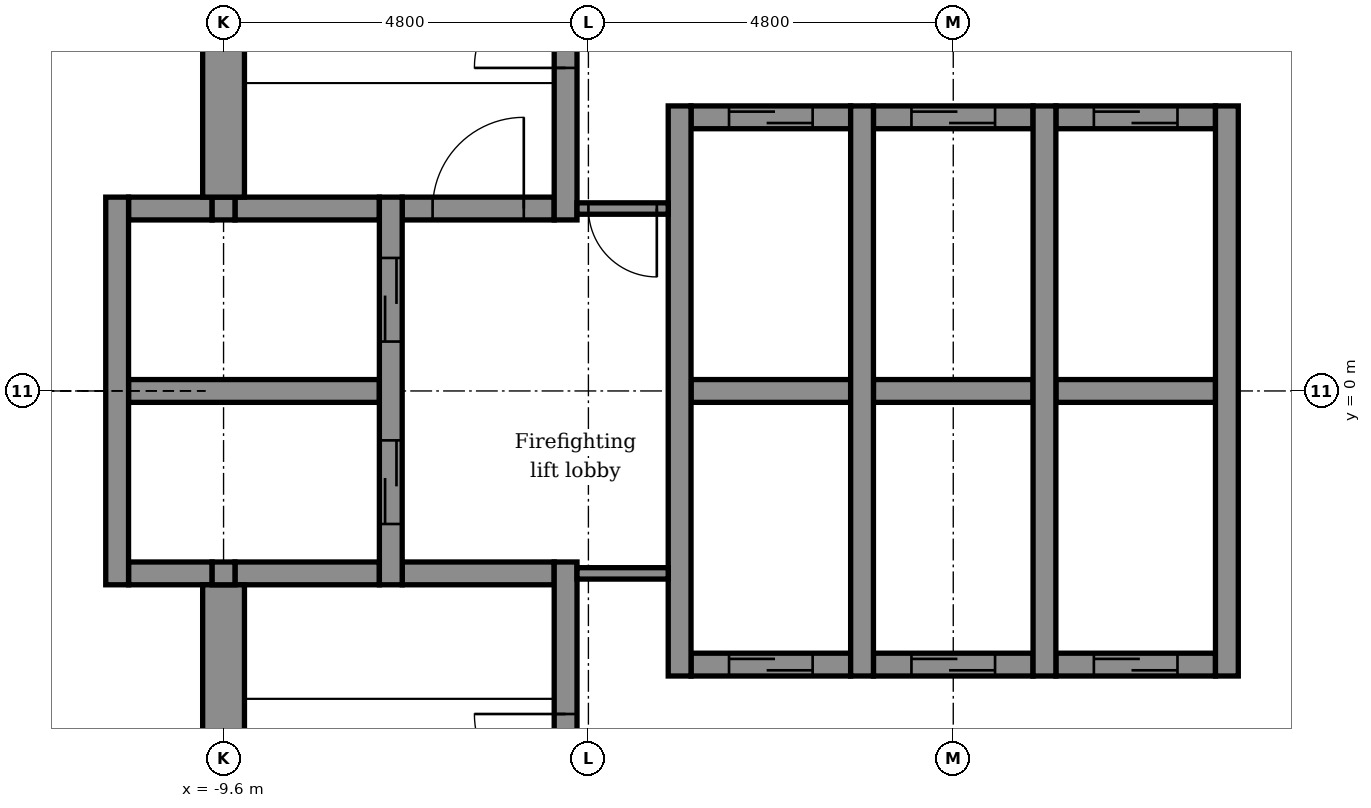
"""IFC4 building model, lengths in metres.
Left out: names, types, materials, properties, quantities, classifications, styles, units other than length and angle.
Written with IfcOpenShell. Run it as: python <this file> out.ifc"""

import sys

from ifc_helpers import new_model, si_unit, direction, frame, frame_2d, origin, place, context, subcontext, project, spatial, rectangle, extrude, element, fill, save


model = new_model("IFC4")
c1 = context("Model", 3, precision=1e-05, world=origin(), true_north=direction((0.0, 1.0)))
c2 = subcontext(c1, "Body", "Model", "MODEL_VIEW")
j1 = project(units=[si_unit("LENGTHUNIT", "METRE"), si_unit("PLANEANGLEUNIT", "RADIAN")], contexts=[c1])
p1 = place(None, origin())
s1 = spatial("IfcSite", under=j1, at=p1, CompositionType="ELEMENT")
p2 = place(p1, origin())
s2 = spatial("IfcBuilding", under=s1, at=p2, CompositionType="ELEMENT")
p3 = place(p2, frame((0.0, 0.0, 238.4)))
s3 = spatial("IfcBuildingStorey", under=s2, at=p3, CompositionType="ELEMENT", Elevation=238.4)
p4 = place(p3, frame((-3.45, -3.6, -0.15), z_axis=(0.0, 0.0, 1.0), x_axis=(1.0, 0.0, 0.0)))
e1 = element("IfcWall", 1, at=p4, inside=s3, PredefinedType="STANDARD", context=c2, shape_type="SweptSolid", body=[
    extrude(rectangle(XDim=2.1, YDim=0.3, at=frame_2d((1.05, 0.0))), origin(), (0.0, 0.0, 1.0), 3.9),
])
p5 = place(p4, frame((0.5, 0.0, 0.15)))
e2 = element("IfcOpeningElement", 2, at=p5, cuts=e1, PredefinedType="OPENING", context=c2, shape_type="SweptSolid", body=[
    extrude(rectangle(XDim=1.1, YDim=2.1, at=frame_2d((0.55, 1.05))), frame((0.0, 0.16, 0.0), z_axis=(0.0, -1.0, 0.0), x_axis=(1.0, 0.0, 0.0)), (0.0, 0.0, 1.0), 0.32),
])
p6 = place(p3, frame((-1.05, -3.6, -0.15), z_axis=(0.0, 0.0, 1.0), x_axis=(1.0, 0.0, 0.0)))
e3 = element("IfcWall", 3, at=p6, inside=s3, PredefinedType="STANDARD", context=c2, shape_type="SweptSolid", body=[
    extrude(rectangle(XDim=2.1, YDim=0.3, at=frame_2d((1.05, 0.0))), origin(), (0.0, 0.0, 1.0), 3.9),
])
p7 = place(p6, frame((0.5, 0.0, 0.15)))
e4 = element("IfcOpeningElement", 4, at=p7, cuts=e3, PredefinedType="OPENING", context=c2, shape_type="SweptSolid", body=[
    extrude(rectangle(XDim=1.1, YDim=2.1, at=frame_2d((0.55, 1.05))), frame((0.0, 0.16, 0.0), z_axis=(0.0, -1.0, 0.0), x_axis=(1.0, 0.0, 0.0)), (0.0, 0.0, 1.0), 0.32),
])
p8 = place(p3, frame((1.35, -3.6, -0.15), z_axis=(0.0, 0.0, 1.0), x_axis=(1.0, 0.0, 0.0)))
e5 = element("IfcWall", 5, at=p8, inside=s3, PredefinedType="STANDARD", context=c2, shape_type="SweptSolid", body=[
    extrude(rectangle(XDim=2.1, YDim=0.3, at=frame_2d((1.05, 0.0))), origin(), (0.0, 0.0, 1.0), 3.9),
])
p9 = place(p8, frame((0.5, 0.0, 0.15)))
e6 = element("IfcOpeningElement", 6, at=p9, cuts=e5, PredefinedType="OPENING", context=c2, shape_type="SweptSolid", body=[
    extrude(rectangle(XDim=1.1, YDim=2.1, at=frame_2d((0.55, 1.05))), frame((0.0, 0.16, 0.0), z_axis=(0.0, -1.0, 0.0), x_axis=(1.0, 0.0, 0.0)), (0.0, 0.0, 1.0), 0.32),
])
p10 = place(p3, frame((-10.85, -2.4, -0.15), z_axis=(0.0, 0.0, 1.0), x_axis=(1.0, 0.0, 0.0)))
e7 = element("IfcWall", 7, at=p10, inside=s3, PredefinedType="STANDARD", context=c2, shape_type="SweptSolid", body=[
    extrude(rectangle(XDim=1.1, YDim=0.3, at=frame_2d((0.55, 0.0))), origin(), (0.0, 0.0, 1.0), 3.9),
])
p11 = place(p3, frame((-9.45, -2.4, -0.15), z_axis=(0.0, 0.0, 1.0), x_axis=(1.0, 0.0, 0.0)))
e8 = element("IfcWall", 8, at=p11, inside=s3, PredefinedType="STANDARD", context=c2, shape_type="SweptSolid", body=[
    extrude(rectangle(XDim=1.9, YDim=0.3, at=frame_2d((0.95, 0.0))), origin(), (0.0, 0.0, 1.0), 3.9),
])
p12 = place(p3, frame((-7.25, -2.4, -0.15), z_axis=(0.0, 0.0, 1.0), x_axis=(1.0, 0.0, 0.0)))
e9 = element("IfcWall", 9, at=p12, inside=s3, PredefinedType="STANDARD", context=c2, shape_type="SweptSolid", body=[
    extrude(rectangle(XDim=2.0, YDim=0.3, at=frame_2d((1.0, 0.0))), origin(), (0.0, 0.0, 1.0), 3.9),
])
p13 = place(p3, frame((-10.85, 0.0, -0.15), z_axis=(0.0, 0.0, 1.0), x_axis=(1.0, 0.0, 0.0)))
e10 = element("IfcWall", 10, at=p13, inside=s3, PredefinedType="STANDARD", context=c2, shape_type="SweptSolid", body=[
    extrude(rectangle(XDim=3.3, YDim=0.3, at=frame_2d((1.65, 0.0))), origin(), (0.0, 0.0, 1.0), 3.9),
])
p14 = place(p3, frame((-3.45, 0.0, -0.15), z_axis=(0.0, 0.0, 1.0), x_axis=(1.0, 0.0, 0.0)))
e11 = element("IfcWall", 11, at=p14, inside=s3, PredefinedType="STANDARD", context=c2, shape_type="SweptSolid", body=[
    extrude(rectangle(XDim=2.1, YDim=0.3, at=frame_2d((1.05, 0.0))), origin(), (0.0, 0.0, 1.0), 3.9),
])
p15 = place(p3, frame((-1.05, 0.0, -0.15), z_axis=(0.0, 0.0, 1.0), x_axis=(1.0, 0.0, 0.0)))
e12 = element("IfcWall", 12, at=p15, inside=s3, PredefinedType="STANDARD", context=c2, shape_type="SweptSolid", body=[
    extrude(rectangle(XDim=2.1, YDim=0.3, at=frame_2d((1.05, 0.0))), origin(), (0.0, 0.0, 1.0), 3.9),
])
p16 = place(p3, frame((1.35, 0.0, -0.15), z_axis=(0.0, 0.0, 1.0), x_axis=(1.0, 0.0, 0.0)))
e13 = element("IfcWall", 13, at=p16, inside=s3, PredefinedType="STANDARD", context=c2, shape_type="SweptSolid", body=[
    extrude(rectangle(XDim=2.1, YDim=0.3, at=frame_2d((1.05, 0.0))), origin(), (0.0, 0.0, 1.0), 3.9),
])
p17 = place(p3, frame((-10.85, 2.4, -0.15), z_axis=(0.0, 0.0, 1.0), x_axis=(1.0, 0.0, 0.0)))
e14 = element("IfcWall", 14, at=p17, inside=s3, PredefinedType="STANDARD", context=c2, shape_type="SweptSolid", body=[
    extrude(rectangle(XDim=1.1, YDim=0.3, at=frame_2d((0.55, 0.0))), origin(), (0.0, 0.0, 1.0), 3.9),
])
p18 = place(p3, frame((-9.45, 2.4, -0.15), z_axis=(0.0, 0.0, 1.0), x_axis=(1.0, 0.0, 0.0)))
e15 = element("IfcWall", 15, at=p18, inside=s3, PredefinedType="STANDARD", context=c2, shape_type="SweptSolid", body=[
    extrude(rectangle(XDim=1.9, YDim=0.3, at=frame_2d((0.95, 0.0))), origin(), (0.0, 0.0, 1.0), 3.9),
])
p19 = place(p3, frame((-7.25, 2.4, -0.15), z_axis=(0.0, 0.0, 1.0), x_axis=(1.0, 0.0, 0.0)))
e16 = element("IfcWall", 16, at=p19, inside=s3, PredefinedType="STANDARD", context=c2, shape_type="SweptSolid", body=[
    extrude(rectangle(XDim=2.0, YDim=0.3, at=frame_2d((1.0, 0.0))), origin(), (0.0, 0.0, 1.0), 3.9),
])
p20 = place(p19, frame((0.4, 0.0, 0.15)))
e17 = element("IfcOpeningElement", 17, at=p20, cuts=e16, PredefinedType="OPENING", context=c2, shape_type="SweptSolid", body=[
    extrude(rectangle(XDim=1.2, YDim=2.1, at=frame_2d((0.6, 1.05))), frame((0.0, 0.16, 0.0), z_axis=(0.0, -1.0, 0.0), x_axis=(1.0, 0.0, 0.0)), (0.0, 0.0, 1.0), 0.32),
])
p21 = place(p3, frame((-3.45, 3.6, -0.15), z_axis=(0.0, 0.0, 1.0), x_axis=(1.0, 0.0, 0.0)))
e18 = element("IfcWall", 18, at=p21, inside=s3, PredefinedType="STANDARD", context=c2, shape_type="SweptSolid", body=[
    extrude(rectangle(XDim=2.1, YDim=0.3, at=frame_2d((1.05, 0.0))), origin(), (0.0, 0.0, 1.0), 3.9),
])
p22 = place(p21, frame((0.5, 0.0, 0.15)))
e19 = element("IfcOpeningElement", 19, at=p22, cuts=e18, PredefinedType="OPENING", context=c2, shape_type="SweptSolid", body=[
    extrude(rectangle(XDim=1.1, YDim=2.1, at=frame_2d((0.55, 1.05))), frame((0.0, 0.16, 0.0), z_axis=(0.0, -1.0, 0.0), x_axis=(1.0, 0.0, 0.0)), (0.0, 0.0, 1.0), 0.32),
])
p23 = place(p3, frame((-1.05, 3.6, -0.15), z_axis=(0.0, 0.0, 1.0), x_axis=(1.0, 0.0, 0.0)))
e20 = element("IfcWall", 20, at=p23, inside=s3, PredefinedType="STANDARD", context=c2, shape_type="SweptSolid", body=[
    extrude(rectangle(XDim=2.1, YDim=0.3, at=frame_2d((1.05, 0.0))), origin(), (0.0, 0.0, 1.0), 3.9),
])
p24 = place(p23, frame((0.5, 0.0, 0.15)))
e21 = element("IfcOpeningElement", 21, at=p24, cuts=e20, PredefinedType="OPENING", context=c2, shape_type="SweptSolid", body=[
    extrude(rectangle(XDim=1.1, YDim=2.1, at=frame_2d((0.55, 1.05))), frame((0.0, 0.16, 0.0), z_axis=(0.0, -1.0, 0.0), x_axis=(1.0, 0.0, 0.0)), (0.0, 0.0, 1.0), 0.32),
])
p25 = place(p3, frame((1.35, 3.6, -0.15), z_axis=(0.0, 0.0, 1.0), x_axis=(1.0, 0.0, 0.0)))
e22 = element("IfcWall", 22, at=p25, inside=s3, PredefinedType="STANDARD", context=c2, shape_type="SweptSolid", body=[
    extrude(rectangle(XDim=2.1, YDim=0.3, at=frame_2d((1.05, 0.0))), origin(), (0.0, 0.0, 1.0), 3.9),
])
p26 = place(p25, frame((0.5, 0.0, 0.15)))
e23 = element("IfcOpeningElement", 23, at=p26, cuts=e22, PredefinedType="OPENING", context=c2, shape_type="SweptSolid", body=[
    extrude(rectangle(XDim=1.1, YDim=2.1, at=frame_2d((0.55, 1.05))), frame((0.0, 0.16, 0.0), z_axis=(0.0, -1.0, 0.0), x_axis=(1.0, 0.0, 0.0)), (0.0, 0.0, 1.0), 0.32),
])
p27 = place(p3, frame((-11.0, -2.55, -0.15), z_axis=(0.0, 0.0, 1.0), x_axis=(0.0, 1.0, 0.0)))
e24 = element("IfcWall", 24, at=p27, inside=s3, PredefinedType="STANDARD", context=c2, shape_type="SweptSolid", body=[
    extrude(rectangle(XDim=5.1, YDim=0.3, at=frame_2d((2.55, 0.0))), origin(), (0.0, 0.0, 1.0), 3.9),
])
p28 = place(p3, frame((-9.6, -10.15, -0.15), z_axis=(0.0, 0.0, 1.0), x_axis=(0.0, 1.0, 0.0)))
e25 = element("IfcWall", 25, at=p28, inside=s3, PredefinedType="SHEAR", context=c2, shape_type="SweptSolid", body=[
    extrude(rectangle(XDim=7.6, YDim=0.55, at=frame_2d((3.8, 0.0))), origin(), (0.0, 0.0, 1.0), 3.9),
])
for number, where, z_axis, x_axis in (
    (26, (-9.6, -2.55, -0.15), (0.0, 0.0, 1.0), (0.0, 1.0, 0.0)),
    (27, (-9.6, 2.25, -0.15), (0.0, 0.0, 1.0), (0.0, 1.0, 0.0)),
):
    element("IfcWall", number, at=place(p3, frame(where, z_axis=z_axis, x_axis=x_axis)), inside=s3, PredefinedType="STANDARD", context=c2, shape_type="SweptSolid", body=[
        extrude(rectangle(XDim=0.3, YDim=0.3, at=frame_2d((0.15, 0.0))), origin(), (0.0, 0.0, 1.0), 3.9),
    ])
p29 = place(p3, frame((-9.6, 2.55, -0.15), z_axis=(0.0, 0.0, 1.0), x_axis=(0.0, 1.0, 0.0)))
e28 = element("IfcWall", 28, at=p29, inside=s3, PredefinedType="SHEAR", context=c2, shape_type="SweptSolid", body=[
    extrude(rectangle(XDim=7.6, YDim=0.55, at=frame_2d((3.8, 0.0))), origin(), (0.0, 0.0, 1.0), 3.9),
])
p30 = place(p3, frame((-7.4, -2.55, -0.15), z_axis=(0.0, 0.0, 1.0), x_axis=(0.0, 1.0, 0.0)))
e29 = element("IfcWall", 29, at=p30, inside=s3, PredefinedType="STANDARD", context=c2, shape_type="SweptSolid", body=[
    extrude(rectangle(XDim=5.1, YDim=0.3, at=frame_2d((2.55, 0.0))), origin(), (0.0, 0.0, 1.0), 3.9),
])
p31 = place(p30, frame((0.8, 0.0, 0.15)))
e30 = element("IfcOpeningElement", 30, at=p31, cuts=e29, PredefinedType="OPENING", context=c2, shape_type="SweptSolid", body=[
    extrude(rectangle(XDim=1.1, YDim=2.1, at=frame_2d((0.55, 1.05))), frame((0.0, 0.16, 0.0), z_axis=(0.0, -1.0, 0.0), x_axis=(1.0, 0.0, 0.0)), (0.0, 0.0, 1.0), 0.32),
])
p32 = place(p30, frame((3.2, 0.0, 0.15)))
e31 = element("IfcOpeningElement", 31, at=p32, cuts=e29, PredefinedType="OPENING", context=c2, shape_type="SweptSolid", body=[
    extrude(rectangle(XDim=1.1, YDim=2.1, at=frame_2d((0.55, 1.05))), frame((0.0, 0.16, 0.0), z_axis=(0.0, -1.0, 0.0), x_axis=(1.0, 0.0, 0.0)), (0.0, 0.0, 1.0), 0.32),
])
p33 = place(p3, frame((-5.1, -9.325, -0.15), z_axis=(0.0, 0.0, 1.0), x_axis=(0.0, 1.0, 0.0)))
e32 = element("IfcWall", 32, at=p33, inside=s3, PredefinedType="STANDARD", context=c2, shape_type="SweptSolid", body=[
    extrude(rectangle(XDim=7.075, YDim=0.3, at=frame_2d((3.538, 0.0))), origin(), (0.0, 0.0, 1.0), 3.9),
])
p34 = place(p33, frame((3.875, 0.0, 0.15)))
e33 = element("IfcOpeningElement", 33, at=p34, cuts=e32, PredefinedType="OPENING", context=c2, shape_type="SweptSolid", body=[
    extrude(rectangle(XDim=1.2, YDim=2.1, at=frame_2d((0.6, 1.05))), frame((0.0, 0.16, 0.0), z_axis=(0.0, -1.0, 0.0), x_axis=(1.0, 0.0, 0.0)), (0.0, 0.0, 1.0), 0.32),
])
p35 = place(p3, frame((-5.1, 2.25, -0.15), z_axis=(0.0, 0.0, 1.0), x_axis=(0.0, 1.0, 0.0)))
e34 = element("IfcWall", 34, at=p35, inside=s3, PredefinedType="STANDARD", context=c2, shape_type="SweptSolid", body=[
    extrude(rectangle(XDim=7.075, YDim=0.3, at=frame_2d((3.538, 0.0))), origin(), (0.0, 0.0, 1.0), 3.9),
])
p36 = place(p35, frame((2.0, 0.0, 0.15)))
e35 = element("IfcOpeningElement", 35, at=p36, cuts=e34, PredefinedType="OPENING", context=c2, shape_type="SweptSolid", body=[
    extrude(rectangle(XDim=1.2, YDim=2.1, at=frame_2d((0.6, 1.05))), frame((0.0, 0.16, 0.0), z_axis=(0.0, -1.0, 0.0), x_axis=(1.0, 0.0, 0.0)), (0.0, 0.0, 1.0), 0.32),
])
for number, where, z_axis, x_axis in (
    (36, (-3.6, -3.75, -0.15), (0.0, 0.0, 1.0), (0.0, 1.0, 0.0)),
    (37, (-1.2, -3.75, -0.15), (0.0, 0.0, 1.0), (0.0, 1.0, 0.0)),
    (38, (1.2, -3.75, -0.15), (0.0, 0.0, 1.0), (0.0, 1.0, 0.0)),
    (39, (3.6, -3.75, -0.15), (0.0, 0.0, 1.0), (0.0, 1.0, 0.0)),
):
    element("IfcWall", number, at=place(p3, frame(where, z_axis=z_axis, x_axis=x_axis)), inside=s3, PredefinedType="STANDARD", context=c2, shape_type="SweptSolid", body=[
        extrude(rectangle(XDim=7.5, YDim=0.3, at=frame_2d((3.75, 0.0))), origin(), (0.0, 0.0, 1.0), 3.9),
    ])
p37 = place(p3, frame((-4.95, 2.4, 0.0), z_axis=(0.0, 0.0, 1.0), x_axis=(1.0, 0.0, 0.0)))
e40 = element("IfcWall", 40, at=p37, inside=s3, PredefinedType="PARTITIONING", context=c2, shape_type="SweptSolid", body=[
    extrude(rectangle(XDim=1.2, YDim=0.15, at=frame_2d((0.6, 0.0))), origin(), (0.0, 0.0, 1.0), 3.75),
])
p38 = place(p37, frame((0.15, 0.0, 0.0)))
e41 = element("IfcOpeningElement", 41, at=p38, cuts=e40, PredefinedType="OPENING", context=c2, shape_type="SweptSolid", body=[
    extrude(rectangle(XDim=0.9, YDim=2.1, at=frame_2d((0.45, 1.05))), frame((0.0, 0.085, 0.0), z_axis=(0.0, -1.0, 0.0), x_axis=(1.0, 0.0, 0.0)), (0.0, 0.0, 1.0), 0.17),
])
p39 = place(p3, frame((-4.95, -2.4, 0.0), z_axis=(0.0, 0.0, 1.0), x_axis=(1.0, 0.0, 0.0)))
e42 = element("IfcWall", 42, at=p39, inside=s3, PredefinedType="PARTITIONING", context=c2, shape_type="SweptSolid", body=[
    extrude(rectangle(XDim=1.2, YDim=0.15, at=frame_2d((0.6, 0.0))), origin(), (0.0, 0.0, 1.0), 3.75),
])
p40 = place(p31, origin())
e43 = element("IfcDoor", 43, at=p40, inside=s3, OperationType="DOUBLE_DOOR_SLIDING", PredefinedType="DOOR", context=c2, shape_type="SweptSolid", body=[
    extrude(rectangle(XDim=1.1, YDim=2.1, at=frame_2d((0.55, 1.05))), frame((0.0, 0.025, 0.0), z_axis=(0.0, -1.0, 0.0), x_axis=(1.0, 0.0, 0.0)), (0.0, 0.0, 1.0), 0.05),
])
fill(e30, e43)
p41 = place(p32, origin())
e44 = element("IfcDoor", 44, at=p41, inside=s3, OperationType="DOUBLE_DOOR_SLIDING", PredefinedType="DOOR", context=c2, shape_type="SweptSolid", body=[
    extrude(rectangle(XDim=1.1, YDim=2.1, at=frame_2d((0.55, 1.05))), frame((0.0, 0.025, 0.0), z_axis=(0.0, -1.0, 0.0), x_axis=(1.0, 0.0, 0.0)), (0.0, 0.0, 1.0), 0.05),
])
fill(e31, e44)
p42 = place(p22, origin())
e45 = element("IfcDoor", 45, at=p42, inside=s3, OperationType="DOUBLE_DOOR_SLIDING", PredefinedType="DOOR", context=c2, shape_type="SweptSolid", body=[
    extrude(rectangle(XDim=1.1, YDim=2.1, at=frame_2d((0.55, 1.05))), frame((0.0, 0.025, 0.0), z_axis=(0.0, -1.0, 0.0), x_axis=(1.0, 0.0, 0.0)), (0.0, 0.0, 1.0), 0.05),
])
fill(e19, e45)
p43 = place(p24, origin())
e46 = element("IfcDoor", 46, at=p43, inside=s3, OperationType="DOUBLE_DOOR_SLIDING", PredefinedType="DOOR", context=c2, shape_type="SweptSolid", body=[
    extrude(rectangle(XDim=1.1, YDim=2.1, at=frame_2d((0.55, 1.05))), frame((0.0, 0.025, 0.0), z_axis=(0.0, -1.0, 0.0), x_axis=(1.0, 0.0, 0.0)), (0.0, 0.0, 1.0), 0.05),
])
fill(e21, e46)
p44 = place(p26, origin())
e47 = element("IfcDoor", 47, at=p44, inside=s3, OperationType="DOUBLE_DOOR_SLIDING", PredefinedType="DOOR", context=c2, shape_type="SweptSolid", body=[
    extrude(rectangle(XDim=1.1, YDim=2.1, at=frame_2d((0.55, 1.05))), frame((0.0, 0.025, 0.0), z_axis=(0.0, -1.0, 0.0), x_axis=(1.0, 0.0, 0.0)), (0.0, 0.0, 1.0), 0.05),
])
fill(e23, e47)
p45 = place(p5, origin())
e48 = element("IfcDoor", 48, at=p45, inside=s3, OperationType="DOUBLE_DOOR_SLIDING", PredefinedType="DOOR", context=c2, shape_type="SweptSolid", body=[
    extrude(rectangle(XDim=1.1, YDim=2.1, at=frame_2d((0.55, 1.05))), frame((0.0, 0.025, 0.0), z_axis=(0.0, -1.0, 0.0), x_axis=(1.0, 0.0, 0.0)), (0.0, 0.0, 1.0), 0.05),
])
fill(e2, e48)
p46 = place(p7, origin())
e49 = element("IfcDoor", 49, at=p46, inside=s3, OperationType="DOUBLE_DOOR_SLIDING", PredefinedType="DOOR", context=c2, shape_type="SweptSolid", body=[
    extrude(rectangle(XDim=1.1, YDim=2.1, at=frame_2d((0.55, 1.05))), frame((0.0, 0.025, 0.0), z_axis=(0.0, -1.0, 0.0), x_axis=(1.0, 0.0, 0.0)), (0.0, 0.0, 1.0), 0.05),
])
fill(e4, e49)
p47 = place(p9, origin())
e50 = element("IfcDoor", 50, at=p47, inside=s3, OperationType="DOUBLE_DOOR_SLIDING", PredefinedType="DOOR", context=c2, shape_type="SweptSolid", body=[
    extrude(rectangle(XDim=1.1, YDim=2.1, at=frame_2d((0.55, 1.05))), frame((0.0, 0.025, 0.0), z_axis=(0.0, -1.0, 0.0), x_axis=(1.0, 0.0, 0.0)), (0.0, 0.0, 1.0), 0.05),
])
fill(e6, e50)
p48 = place(p36, origin())
e51 = element("IfcDoor", 51, at=p48, inside=s3, OperationType="SINGLE_SWING_LEFT", PredefinedType="DOOR", context=c2, shape_type="SweptSolid", body=[
    extrude(rectangle(XDim=1.2, YDim=2.1, at=frame_2d((0.6, 1.05))), frame((0.0, 0.025, 0.0), z_axis=(0.0, -1.0, 0.0), x_axis=(1.0, 0.0, 0.0)), (0.0, 0.0, 1.0), 0.05),
])
fill(e35, e51)
p49 = place(p34, origin())
e52 = element("IfcDoor", 52, at=p49, inside=s3, OperationType="SINGLE_SWING_RIGHT", PredefinedType="DOOR", context=c2, shape_type="SweptSolid", body=[
    extrude(rectangle(XDim=1.2, YDim=2.1, at=frame_2d((0.6, 1.05))), frame((0.0, 0.025, 0.0), z_axis=(0.0, -1.0, 0.0), x_axis=(1.0, 0.0, 0.0)), (0.0, 0.0, 1.0), 0.05),
])
fill(e33, e52)
p50 = place(p38, frame((0.9, 0.0, 0.0), z_axis=(0.0, 0.0, 1.0), x_axis=(-1.0, 0.0, 0.0)))
e53 = element("IfcDoor", 53, at=p50, inside=s3, OperationType="SINGLE_SWING_RIGHT", PredefinedType="DOOR", context=c2, shape_type="SweptSolid", body=[
    extrude(rectangle(XDim=0.9, YDim=2.1, at=frame_2d((0.45, 1.05))), frame((0.0, 0.025, 0.0), z_axis=(0.0, -1.0, 0.0), x_axis=(1.0, 0.0, 0.0)), (0.0, 0.0, 1.0), 0.05),
])
fill(e41, e53)
p51 = place(p20, origin())
e54 = element("IfcDoor", 54, at=p51, inside=s3, OperationType="SINGLE_SWING_RIGHT", PredefinedType="DOOR", context=c2, shape_type="SweptSolid", body=[
    extrude(rectangle(XDim=1.2, YDim=2.1, at=frame_2d((0.6, 1.05))), frame((0.0, 0.025, 0.0), z_axis=(0.0, -1.0, 0.0), x_axis=(1.0, 0.0, 0.0)), (0.0, 0.0, 1.0), 0.05),
])
fill(e17, e54)
save(model, sys.argv[1])
